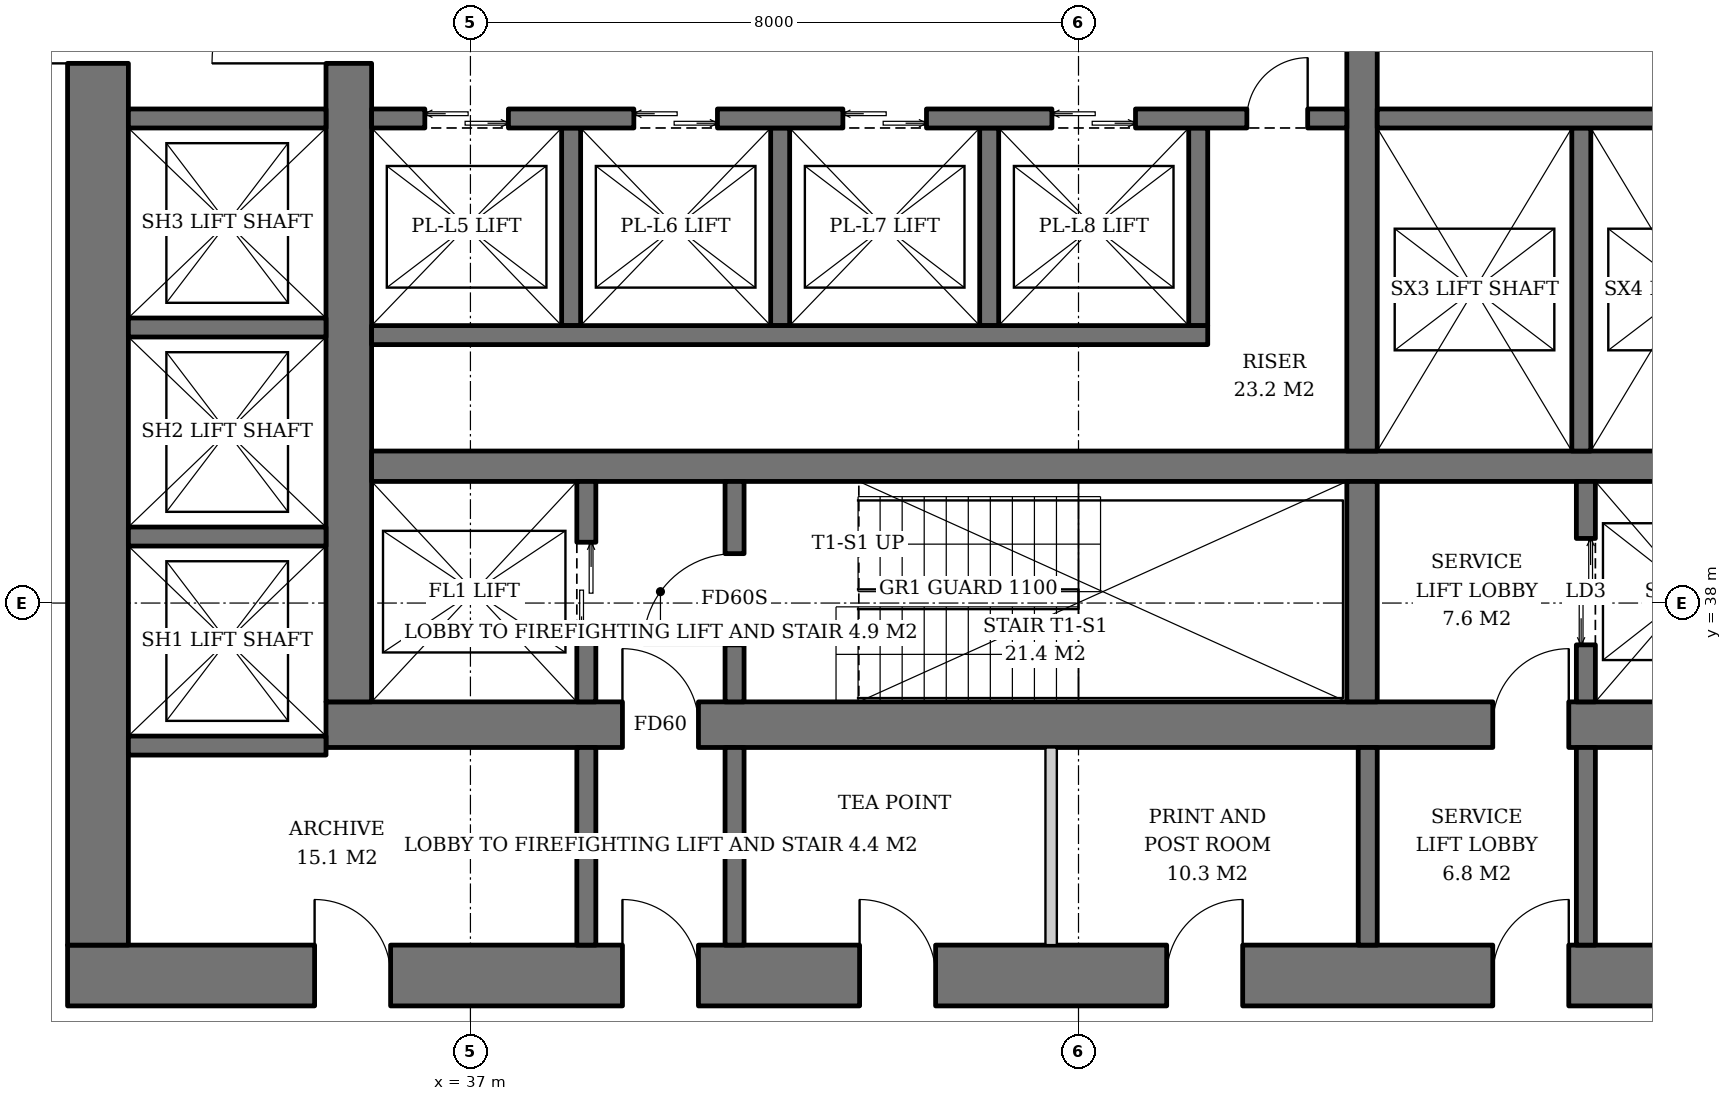
"""IFC4 building model, lengths in metres.
Left out: names, types, materials, properties, quantities, classifications, styles, units other than length and angle.
Written with IfcOpenShell. Run it as: python <this file> out.ifc"""

import sys

from ifc_helpers import new_model, si_unit, direction, frame, frame_2d, origin, place, context, subcontext, project, spatial, rectangle, extrude, element, fill, save


model = new_model("IFC4")
c1 = context("Model", 3, precision=1e-05, world=origin(), true_north=direction((0.0, 1.0)))
c2 = subcontext(c1, "Body", "Model", "MODEL_VIEW")
j1 = project(units=[si_unit("LENGTHUNIT", "METRE"), si_unit("PLANEANGLEUNIT", "RADIAN")], contexts=[c1])
p1 = place(None, origin())
s1 = spatial("IfcSite", under=j1, at=p1, CompositionType="ELEMENT")
p2 = place(p1, origin())
s2 = spatial("IfcBuilding", under=s1, at=p2, CompositionType="ELEMENT")
p3 = place(p2, frame((0.0, 0.0, 28.6)))
s3 = spatial("IfcBuildingStorey", under=s2, at=p3, CompositionType="ELEMENT", Elevation=28.6)
p4 = place(p3, frame((35.1, 36.4, 0.0), z_axis=(0.0, 0.0, 1.0), x_axis=(1.0, 0.0, 0.0)))
e1 = element("IfcWall", 1, at=p4, inside=s3, PredefinedType="SHEAR", context=c2, shape_type="SweptSolid", body=[
    extrude(rectangle(XDim=19.8, YDim=0.6, at=frame_2d((9.9, 0.0))), origin(), (0.0, 0.0, 1.0), 3.8),
])
p5 = place(p4, frame((3.9, 0.0, 0.0)))
e2 = element("IfcOpeningElement", 2, at=p5, cuts=e1, PredefinedType="OPENING", context=c2, shape_type="SweptSolid", body=[
    extrude(rectangle(XDim=1.0, YDim=2.1, at=frame_2d((0.5, 1.05))), frame((0.0, 0.31, 0.0), z_axis=(0.0, -1.0, 0.0), x_axis=(1.0, 0.0, 0.0)), (0.0, 0.0, 1.0), 0.62),
])
p6 = place(p4, frame((15.35, 0.0, 0.0)))
e3 = element("IfcOpeningElement", 3, at=p6, cuts=e1, PredefinedType="OPENING", context=c2, shape_type="SweptSolid", body=[
    extrude(rectangle(XDim=1.0, YDim=2.1, at=frame_2d((0.5, 1.05))), frame((0.0, 0.31, 0.0), z_axis=(0.0, -1.0, 0.0), x_axis=(1.0, 0.0, 0.0)), (0.0, 0.0, 1.0), 0.62),
])
p7 = place(p3, frame((35.4, 36.7, 0.0), z_axis=(0.0, 0.0, 1.0), x_axis=(0.0, 1.0, 0.0)))
e4 = element("IfcWall", 4, at=p7, inside=s3, PredefinedType="SHEAR", context=c2, shape_type="SweptSolid", body=[
    extrude(rectangle(XDim=18.6, YDim=0.6, at=frame_2d((9.3, 0.0))), origin(), (0.0, 0.0, 1.0), 3.8),
])
p8 = place(p7, frame((8.4, 0.0, 0.0)))
e5 = element("IfcOpeningElement", 5, at=p8, cuts=e4, PredefinedType="OPENING", context=c2, shape_type="SweptSolid", body=[
    extrude(rectangle(XDim=1.8, YDim=2.4, at=frame_2d((0.9, 1.2))), frame((0.0, 0.31, 0.0), z_axis=(0.0, -1.0, 0.0), x_axis=(1.0, 0.0, 0.0)), (0.0, 0.0, 1.0), 0.62),
])
p9 = place(p3, frame((31.7, 33.1, 0.0), z_axis=(0.0, 0.0, 1.0), x_axis=(1.0, 0.0, 0.0)))
e6 = element("IfcWall", 6, at=p9, inside=s3, PredefinedType="SHEAR", context=c2, shape_type="SweptSolid", body=[
    extrude(rectangle(XDim=26.6, YDim=0.8, at=frame_2d((13.3, 0.0))), origin(), (0.0, 0.0, 1.0), 3.8),
])
p10 = place(p9, frame((7.3, 0.0, 0.0)))
e7 = element("IfcOpeningElement", 7, at=p10, cuts=e6, PredefinedType="OPENING", context=c2, shape_type="SweptSolid", body=[
    extrude(rectangle(XDim=1.0, YDim=2.1, at=frame_2d((0.5, 1.05))), frame((0.0, 0.41, 0.0), z_axis=(0.0, -1.0, 0.0), x_axis=(1.0, 0.0, 0.0)), (0.0, 0.0, 1.0), 0.82),
])
p11 = place(p9, frame((18.75, 0.0, 0.0)))
e8 = element("IfcOpeningElement", 8, at=p11, cuts=e6, PredefinedType="OPENING", context=c2, shape_type="SweptSolid", body=[
    extrude(rectangle(XDim=1.0, YDim=2.1, at=frame_2d((0.5, 1.05))), frame((0.0, 0.41, 0.0), z_axis=(0.0, -1.0, 0.0), x_axis=(1.0, 0.0, 0.0)), (0.0, 0.0, 1.0), 0.82),
])
p12 = place(p9, frame((3.25, 0.0, 0.0)))
e9 = element("IfcOpeningElement", 9, at=p12, cuts=e6, PredefinedType="OPENING", context=c2, shape_type="SweptSolid", body=[
    extrude(rectangle(XDim=1.0, YDim=2.1, at=frame_2d((0.5, 1.05))), frame((0.0, 0.41, 0.0), z_axis=(0.0, -1.0, 0.0), x_axis=(1.0, 0.0, 0.0)), (0.0, 0.0, 1.0), 0.82),
])
p13 = place(p9, frame((10.42, 0.0, 0.0)))
e10 = element("IfcOpeningElement", 10, at=p13, cuts=e6, PredefinedType="OPENING", context=c2, shape_type="SweptSolid", body=[
    extrude(rectangle(XDim=1.0, YDim=2.1, at=frame_2d((0.5, 1.05))), frame((0.0, 0.41, 0.0), z_axis=(0.0, -1.0, 0.0), x_axis=(1.0, 0.0, 0.0)), (0.0, 0.0, 1.0), 0.82),
])
p14 = place(p9, frame((14.46, 0.0, 0.0)))
e11 = element("IfcOpeningElement", 11, at=p14, cuts=e6, PredefinedType="OPENING", context=c2, shape_type="SweptSolid", body=[
    extrude(rectangle(XDim=1.0, YDim=2.1, at=frame_2d((0.5, 1.05))), frame((0.0, 0.41, 0.0), z_axis=(0.0, -1.0, 0.0), x_axis=(1.0, 0.0, 0.0)), (0.0, 0.0, 1.0), 0.82),
])
p15 = place(p9, frame((22.45, 0.0, 0.0)))
e12 = element("IfcOpeningElement", 12, at=p15, cuts=e6, PredefinedType="OPENING", context=c2, shape_type="SweptSolid", body=[
    extrude(rectangle(XDim=1.0, YDim=2.1, at=frame_2d((0.5, 1.05))), frame((0.0, 0.41, 0.0), z_axis=(0.0, -1.0, 0.0), x_axis=(1.0, 0.0, 0.0)), (0.0, 0.0, 1.0), 0.82),
])
p16 = place(p3, frame((32.1, 33.5, 0.0), z_axis=(0.0, 0.0, 1.0), x_axis=(0.0, 1.0, 0.0)))
e13 = element("IfcWall", 13, at=p16, inside=s3, PredefinedType="SHEAR", context=c2, shape_type="SweptSolid", body=[
    extrude(rectangle(XDim=25.0, YDim=0.8, at=frame_2d((12.5, 0.0))), origin(), (0.0, 0.0, 1.0), 3.8),
])
p17 = place(p16, frame((11.6, 0.0, 0.0)))
e14 = element("IfcOpeningElement", 14, at=p17, cuts=e13, PredefinedType="OPENING", context=c2, shape_type="SweptSolid", body=[
    extrude(rectangle(XDim=1.8, YDim=2.4, at=frame_2d((0.9, 1.2))), frame((0.0, 0.41, 0.0), z_axis=(0.0, -1.0, 0.0), x_axis=(1.0, 0.0, 0.0)), (0.0, 0.0, 1.0), 0.82),
])
p18 = place(p3, frame((35.7, 39.8, 0.0), z_axis=(0.0, 0.0, 1.0), x_axis=(1.0, 0.0, 0.0)))
e15 = element("IfcWall", 15, at=p18, inside=s3, PredefinedType="SHEAR", context=c2, shape_type="SweptSolid", body=[
    extrude(rectangle(XDim=18.6, YDim=0.4, at=frame_2d((9.3, 0.0))), origin(), (0.0, 0.0, 1.0), 3.8),
])
p19 = place(p3, frame((48.73, 36.7, 0.0), z_axis=(0.0, 0.0, 1.0), x_axis=(0.0, 1.0, 0.0)))
e16 = element("IfcWall", 16, at=p19, inside=s3, PredefinedType="SHEAR", context=c2, shape_type="SweptSolid", body=[
    extrude(rectangle(XDim=2.9, YDim=0.4, at=frame_2d((1.45, 0.0))), origin(), (0.0, 0.0, 1.0), 3.8),
])
p20 = place(p3, frame((48.73, 40.0, 0.0), z_axis=(0.0, 0.0, 1.0), x_axis=(0.0, 1.0, 0.0)))
e17 = element("IfcWall", 17, at=p20, inside=s3, PredefinedType="SHEAR", context=c2, shape_type="SweptSolid", body=[
    extrude(rectangle(XDim=12.0, YDim=0.4, at=frame_2d((6.0, 0.0))), origin(), (0.0, 0.0, 1.0), 3.8),
])
p21 = place(p3, frame((38.525, 36.7, 0.0), z_axis=(0.0, 0.0, 1.0), x_axis=(0.0, 1.0, 0.0)))
e18 = element("IfcWall", 18, at=p21, inside=s3, PredefinedType="SHEAR", context=c2, shape_type="SweptSolid", body=[
    extrude(rectangle(XDim=2.9, YDim=0.25, at=frame_2d((1.45, 0.0))), origin(), (0.0, 0.0, 1.0), 3.8),
])
p22 = place(p21, frame((0.8, 0.0, 0.0)))
e19 = element("IfcOpeningElement", 19, at=p22, cuts=e18, PredefinedType="OPENING", context=c2, shape_type="SweptSolid", body=[
    extrude(rectangle(XDim=1.3, YDim=2.2, at=frame_2d((0.65, 1.1))), frame((0.0, 0.135, 0.0), z_axis=(0.0, -1.0, 0.0), x_axis=(1.0, 0.0, 0.0)), (0.0, 0.0, 1.0), 0.27),
])
p23 = place(p3, frame((40.475, 36.7, 0.0), z_axis=(0.0, 0.0, 1.0), x_axis=(0.0, 1.0, 0.0)))
e20 = element("IfcWall", 20, at=p23, inside=s3, PredefinedType="SHEAR", context=c2, shape_type="SweptSolid", body=[
    extrude(rectangle(XDim=2.9, YDim=0.25, at=frame_2d((1.45, 0.0))), origin(), (0.0, 0.0, 1.0), 3.8),
])
p24 = place(p23, frame((0.75, 0.0, 0.0)))
e21 = element("IfcOpeningElement", 21, at=p24, cuts=e20, PredefinedType="OPENING", context=c2, shape_type="SweptSolid", body=[
    extrude(rectangle(XDim=1.2, YDim=2.1, at=frame_2d((0.6, 1.05))), frame((0.0, 0.135, 0.0), z_axis=(0.0, -1.0, 0.0), x_axis=(1.0, 0.0, 0.0)), (0.0, 0.0, 1.0), 0.27),
])
p25 = place(p3, frame((51.675, 36.7, 0.0), z_axis=(0.0, 0.0, 1.0), x_axis=(0.0, 1.0, 0.0)))
e22 = element("IfcWall", 22, at=p25, inside=s3, PredefinedType="SHEAR", context=c2, shape_type="SweptSolid", body=[
    extrude(rectangle(XDim=2.9, YDim=0.25, at=frame_2d((1.45, 0.0))), origin(), (0.0, 0.0, 1.0), 3.8),
])
p26 = place(p25, frame((0.75, 0.0, 0.0)))
e23 = element("IfcOpeningElement", 23, at=p26, cuts=e22, PredefinedType="OPENING", context=c2, shape_type="SweptSolid", body=[
    extrude(rectangle(XDim=1.4, YDim=2.4, at=frame_2d((0.7, 1.2))), frame((0.0, 0.135, 0.0), z_axis=(0.0, -1.0, 0.0), x_axis=(1.0, 0.0, 0.0)), (0.0, 0.0, 1.0), 0.27),
])
for number, where, z_axis, x_axis in (
    (24, (38.325, 44.25, 0.0), (0.0, 0.0, 1.0), (0.0, -1.0, 0.0)),
    (25, (41.075, 44.25, 0.0), (0.0, 0.0, 1.0), (0.0, -1.0, 0.0)),
    (26, (43.825, 44.25, 0.0), (0.0, 0.0, 1.0), (0.0, -1.0, 0.0)),
    (27, (46.575, 44.25, 0.0), (0.0, 0.0, 1.0), (0.0, -1.0, 0.0)),
):
    element("IfcWall", number, at=place(p3, frame(where, z_axis=z_axis, x_axis=x_axis)), inside=s3, PredefinedType="SHEAR", context=c2, shape_type="SweptSolid", body=[
        extrude(rectangle(XDim=2.6, YDim=0.25, at=frame_2d((1.3, 0.0))), origin(), (0.0, 0.0, 1.0), 3.8),
    ])
p27 = place(p3, frame((35.7, 41.525, 0.0), z_axis=(0.0, 0.0, 1.0), x_axis=(1.0, 0.0, 0.0)))
e28 = element("IfcWall", 28, at=p27, inside=s3, PredefinedType="SHEAR", context=c2, shape_type="SweptSolid", body=[
    extrude(rectangle(XDim=11.0, YDim=0.25, at=frame_2d((5.5, 0.0))), origin(), (0.0, 0.0, 1.0), 3.8),
])
p28 = place(p3, frame((35.7, 44.375, 0.0), z_axis=(0.0, 0.0, 1.0), x_axis=(1.0, 0.0, 0.0)))
e29 = element("IfcWall", 29, at=p28, inside=s3, PredefinedType="SHEAR", context=c2, shape_type="SweptSolid", body=[
    extrude(rectangle(XDim=12.83, YDim=0.25, at=frame_2d((6.415, 0.0))), origin(), (0.0, 0.0, 1.0), 3.8),
])
p29 = place(p28, frame((0.7, 0.0, 0.0)))
e30 = element("IfcOpeningElement", 30, at=p29, cuts=e29, PredefinedType="OPENING", context=c2, shape_type="SweptSolid", body=[
    extrude(rectangle(XDim=1.1, YDim=2.2, at=frame_2d((0.55, 1.1))), frame((0.0, 0.135, 0.0), z_axis=(0.0, -1.0, 0.0), x_axis=(1.0, 0.0, 0.0)), (0.0, 0.0, 1.0), 0.27),
])
p30 = place(p28, frame((3.45, 0.0, 0.0)))
e31 = element("IfcOpeningElement", 31, at=p30, cuts=e29, PredefinedType="OPENING", context=c2, shape_type="SweptSolid", body=[
    extrude(rectangle(XDim=1.1, YDim=2.2, at=frame_2d((0.55, 1.1))), frame((0.0, 0.135, 0.0), z_axis=(0.0, -1.0, 0.0), x_axis=(1.0, 0.0, 0.0)), (0.0, 0.0, 1.0), 0.27),
])
p31 = place(p28, frame((6.2, 0.0, 0.0)))
e32 = element("IfcOpeningElement", 32, at=p31, cuts=e29, PredefinedType="OPENING", context=c2, shape_type="SweptSolid", body=[
    extrude(rectangle(XDim=1.1, YDim=2.2, at=frame_2d((0.55, 1.1))), frame((0.0, 0.135, 0.0), z_axis=(0.0, -1.0, 0.0), x_axis=(1.0, 0.0, 0.0)), (0.0, 0.0, 1.0), 0.27),
])
p32 = place(p28, frame((8.95, 0.0, 0.0)))
e33 = element("IfcOpeningElement", 33, at=p32, cuts=e29, PredefinedType="OPENING", context=c2, shape_type="SweptSolid", body=[
    extrude(rectangle(XDim=1.1, YDim=2.2, at=frame_2d((0.55, 1.1))), frame((0.0, 0.135, 0.0), z_axis=(0.0, -1.0, 0.0), x_axis=(1.0, 0.0, 0.0)), (0.0, 0.0, 1.0), 0.27),
])
p33 = place(p28, frame((11.515, 0.0, 0.0)))
e34 = element("IfcOpeningElement", 34, at=p33, cuts=e29, PredefinedType="OPENING", context=c2, shape_type="SweptSolid", body=[
    extrude(rectangle(XDim=0.8, YDim=2.0, at=frame_2d((0.4, 1.0))), frame((0.0, 0.135, 0.0), z_axis=(0.0, -1.0, 0.0), x_axis=(1.0, 0.0, 0.0)), (0.0, 0.0, 1.0), 0.27),
])
p34 = place(p3, frame((51.615, 44.25, 0.0), z_axis=(0.0, 0.0, 1.0), x_axis=(0.0, -1.0, 0.0)))
e35 = element("IfcWall", 35, at=p34, inside=s3, PredefinedType="SHEAR", context=c2, shape_type="SweptSolid", body=[
    extrude(rectangle(XDim=4.25, YDim=0.25, at=frame_2d((2.125, 0.0))), origin(), (0.0, 0.0, 1.0), 3.8),
])
p35 = place(p3, frame((48.93, 44.375, 0.0), z_axis=(0.0, 0.0, 1.0), x_axis=(1.0, 0.0, 0.0)))
e36 = element("IfcWall", 36, at=p35, inside=s3, PredefinedType="SHEAR", context=c2, shape_type="SweptSolid", body=[
    extrude(rectangle(XDim=5.37, YDim=0.25, at=frame_2d((2.685, 0.0))), origin(), (0.0, 0.0, 1.0), 3.8),
])
for number, where, z_axis, x_axis in (
    (37, (32.5, 36.125, 0.0), (0.0, 0.0, 1.0), (1.0, 0.0, 0.0)),
    (38, (32.5, 38.875, 0.0), (0.0, 0.0, 1.0), (1.0, 0.0, 0.0)),
    (39, (32.5, 41.625, 0.0), (0.0, 0.0, 1.0), (1.0, 0.0, 0.0)),
    (40, (32.5, 44.375, 0.0), (0.0, 0.0, 1.0), (1.0, 0.0, 0.0)),
):
    element("IfcWall", number, at=place(p3, frame(where, z_axis=z_axis, x_axis=x_axis)), inside=s3, PredefinedType="SHEAR", context=c2, shape_type="SweptSolid", body=[
        extrude(rectangle(XDim=2.6, YDim=0.25, at=frame_2d((1.3, 0.0))), origin(), (0.0, 0.0, 1.0), 3.8),
    ])
for number, where, z_axis, x_axis in (
    (41, (38.525, 33.5, 0.0), (0.0, 0.0, 1.0), (0.0, 1.0, 0.0)),
    (42, (40.475, 33.5, 0.0), (0.0, 0.0, 1.0), (0.0, 1.0, 0.0)),
    (43, (48.805, 33.5, 0.0), (0.0, 0.0, 1.0), (0.0, 1.0, 0.0)),
    (44, (51.675, 33.5, 0.0), (0.0, 0.0, 1.0), (0.0, 1.0, 0.0)),
):
    element("IfcWall", number, at=place(p3, frame(where, z_axis=z_axis, x_axis=x_axis)), inside=s3, PredefinedType="SOLIDWALL", context=c2, shape_type="SweptSolid", body=[
        extrude(rectangle(XDim=2.6, YDim=0.25, at=frame_2d((1.3, 0.0))), origin(), (0.0, 0.0, 1.0), 3.62),
    ])
p36 = place(p3, frame((44.64, 33.5, 0.0), z_axis=(0.0, 0.0, 1.0), x_axis=(0.0, 1.0, 0.0)))
e45 = element("IfcWall", 45, at=p36, inside=s3, PredefinedType="SOLIDWALL", context=c2, shape_type="SweptSolid", body=[
    extrude(rectangle(XDim=2.6, YDim=0.15, at=frame_2d((1.3, 0.0))), origin(), (0.0, 0.0, 1.0), 3.62),
])
p37 = place(p22, origin())
e46 = element("IfcDoor", 46, at=p37, inside=s3, OperationType="DOUBLE_DOOR_SLIDING", PredefinedType="DOOR", context=c2, shape_type="SweptSolid", body=[
    extrude(rectangle(XDim=1.3, YDim=2.2, at=frame_2d((0.65, 1.1))), frame((0.0, 0.025, 0.0), z_axis=(0.0, -1.0, 0.0), x_axis=(1.0, 0.0, 0.0)), (0.0, 0.0, 1.0), 0.05),
])
fill(e19, e46)
p38 = place(p24, origin())
e47 = element("IfcDoor", 47, at=p38, inside=s3, OperationType="SINGLE_SWING_LEFT", PredefinedType="DOOR", context=c2, shape_type="SweptSolid", body=[
    extrude(rectangle(XDim=1.2, YDim=2.1, at=frame_2d((0.6, 1.05))), frame((0.0, 0.025, 0.0), z_axis=(0.0, -1.0, 0.0), x_axis=(1.0, 0.0, 0.0)), (0.0, 0.0, 1.0), 0.05),
])
fill(e21, e47)
p39 = place(p26, origin())
e48 = element("IfcDoor", 48, at=p39, inside=s3, OperationType="DOUBLE_DOOR_SLIDING", PredefinedType="DOOR", context=c2, shape_type="SweptSolid", body=[
    extrude(rectangle(XDim=1.4, YDim=2.4, at=frame_2d((0.7, 1.2))), frame((0.0, 0.025, 0.0), z_axis=(0.0, -1.0, 0.0), x_axis=(1.0, 0.0, 0.0)), (0.0, 0.0, 1.0), 0.05),
])
fill(e23, e48)
p40 = place(p29, origin())
e49 = element("IfcDoor", 49, at=p40, inside=s3, OperationType="DOUBLE_DOOR_SLIDING", PredefinedType="DOOR", context=c2, shape_type="SweptSolid", body=[
    extrude(rectangle(XDim=1.1, YDim=2.2, at=frame_2d((0.55, 1.1))), frame((0.0, 0.025, 0.0), z_axis=(0.0, -1.0, 0.0), x_axis=(1.0, 0.0, 0.0)), (0.0, 0.0, 1.0), 0.05),
])
fill(e30, e49)
p41 = place(p30, origin())
e50 = element("IfcDoor", 50, at=p41, inside=s3, OperationType="DOUBLE_DOOR_SLIDING", PredefinedType="DOOR", context=c2, shape_type="SweptSolid", body=[
    extrude(rectangle(XDim=1.1, YDim=2.2, at=frame_2d((0.55, 1.1))), frame((0.0, 0.025, 0.0), z_axis=(0.0, -1.0, 0.0), x_axis=(1.0, 0.0, 0.0)), (0.0, 0.0, 1.0), 0.05),
])
fill(e31, e50)
p42 = place(p31, origin())
e51 = element("IfcDoor", 51, at=p42, inside=s3, OperationType="DOUBLE_DOOR_SLIDING", PredefinedType="DOOR", context=c2, shape_type="SweptSolid", body=[
    extrude(rectangle(XDim=1.1, YDim=2.2, at=frame_2d((0.55, 1.1))), frame((0.0, 0.025, 0.0), z_axis=(0.0, -1.0, 0.0), x_axis=(1.0, 0.0, 0.0)), (0.0, 0.0, 1.0), 0.05),
])
fill(e32, e51)
p43 = place(p32, origin())
e52 = element("IfcDoor", 52, at=p43, inside=s3, OperationType="DOUBLE_DOOR_SLIDING", PredefinedType="DOOR", context=c2, shape_type="SweptSolid", body=[
    extrude(rectangle(XDim=1.1, YDim=2.2, at=frame_2d((0.55, 1.1))), frame((0.0, 0.025, 0.0), z_axis=(0.0, -1.0, 0.0), x_axis=(1.0, 0.0, 0.0)), (0.0, 0.0, 1.0), 0.05),
])
fill(e33, e52)
p44 = place(p33, origin())
e53 = element("IfcDoor", 53, at=p44, inside=s3, OperationType="SINGLE_SWING_RIGHT", PredefinedType="DOOR", context=c2, shape_type="SweptSolid", body=[
    extrude(rectangle(XDim=0.8, YDim=2.0, at=frame_2d((0.4, 1.0))), frame((0.0, 0.025, 0.0), z_axis=(0.0, -1.0, 0.0), x_axis=(1.0, 0.0, 0.0)), (0.0, 0.0, 1.0), 0.05),
])
fill(e34, e53)
p45 = place(p5, origin())
e54 = element("IfcDoor", 54, at=p45, inside=s3, OperationType="SINGLE_SWING_LEFT", PredefinedType="DOOR", context=c2, shape_type="SweptSolid", body=[
    extrude(rectangle(XDim=1.0, YDim=2.1, at=frame_2d((0.5, 1.05))), frame((0.0, 0.025, 0.0), z_axis=(0.0, -1.0, 0.0), x_axis=(1.0, 0.0, 0.0)), (0.0, 0.0, 1.0), 0.05),
])
fill(e2, e54)
p46 = place(p8, origin())
e55 = element("IfcDoor", 55, at=p46, inside=s3, OperationType="DOUBLE_DOOR_SINGLE_SWING", PredefinedType="DOOR", context=c2, shape_type="SweptSolid", body=[
    extrude(rectangle(XDim=1.8, YDim=2.4, at=frame_2d((0.9, 1.2))), frame((0.0, 0.025, 0.0), z_axis=(0.0, -1.0, 0.0), x_axis=(1.0, 0.0, 0.0)), (0.0, 0.0, 1.0), 0.05),
])
fill(e5, e55)
p47 = place(p6, origin())
e56 = element("IfcDoor", 56, at=p47, inside=s3, OperationType="SINGLE_SWING_RIGHT", PredefinedType="DOOR", context=c2, shape_type="SweptSolid", body=[
    extrude(rectangle(XDim=1.0, YDim=2.1, at=frame_2d((0.5, 1.05))), frame((0.0, 0.025, 0.0), z_axis=(0.0, -1.0, 0.0), x_axis=(1.0, 0.0, 0.0)), (0.0, 0.0, 1.0), 0.05),
])
fill(e3, e56)
p48 = place(p17, origin())
e57 = element("IfcDoor", 57, at=p48, inside=s3, OperationType="DOUBLE_DOOR_SINGLE_SWING", PredefinedType="DOOR", context=c2, shape_type="SweptSolid", body=[
    extrude(rectangle(XDim=1.8, YDim=2.4, at=frame_2d((0.9, 1.2))), frame((0.0, 0.025, 0.0), z_axis=(0.0, -1.0, 0.0), x_axis=(1.0, 0.0, 0.0)), (0.0, 0.0, 1.0), 0.05),
])
fill(e14, e57)
p49 = place(p10, origin())
e58 = element("IfcDoor", 58, at=p49, inside=s3, OperationType="SINGLE_SWING_LEFT", PredefinedType="DOOR", context=c2, shape_type="SweptSolid", body=[
    extrude(rectangle(XDim=1.0, YDim=2.1, at=frame_2d((0.5, 1.05))), frame((0.0, 0.025, 0.0), z_axis=(0.0, -1.0, 0.0), x_axis=(1.0, 0.0, 0.0)), (0.0, 0.0, 1.0), 0.05),
])
fill(e7, e58)
p50 = place(p11, origin())
e59 = element("IfcDoor", 59, at=p50, inside=s3, OperationType="SINGLE_SWING_RIGHT", PredefinedType="DOOR", context=c2, shape_type="SweptSolid", body=[
    extrude(rectangle(XDim=1.0, YDim=2.1, at=frame_2d((0.5, 1.05))), frame((0.0, 0.025, 0.0), z_axis=(0.0, -1.0, 0.0), x_axis=(1.0, 0.0, 0.0)), (0.0, 0.0, 1.0), 0.05),
])
fill(e8, e59)
p51 = place(p12, origin())
e60 = element("IfcDoor", 60, at=p51, inside=s3, OperationType="SINGLE_SWING_LEFT", PredefinedType="DOOR", context=c2, shape_type="SweptSolid", body=[
    extrude(rectangle(XDim=1.0, YDim=2.1, at=frame_2d((0.5, 1.05))), frame((0.0, 0.39, 0.0), z_axis=(0.0, -1.0, 0.0), x_axis=(1.0, 0.0, 0.0)), (0.0, 0.0, 1.0), 0.05),
])
fill(e9, e60)
p52 = place(p13, origin())
e61 = element("IfcDoor", 61, at=p52, inside=s3, OperationType="SINGLE_SWING_LEFT", PredefinedType="DOOR", context=c2, shape_type="SweptSolid", body=[
    extrude(rectangle(XDim=1.0, YDim=2.1, at=frame_2d((0.5, 1.05))), frame((0.0, 0.39, 0.0), z_axis=(0.0, -1.0, 0.0), x_axis=(1.0, 0.0, 0.0)), (0.0, 0.0, 1.0), 0.05),
])
fill(e10, e61)
p53 = place(p14, origin())
e62 = element("IfcDoor", 62, at=p53, inside=s3, OperationType="SINGLE_SWING_RIGHT", PredefinedType="DOOR", context=c2, shape_type="SweptSolid", body=[
    extrude(rectangle(XDim=1.0, YDim=2.1, at=frame_2d((0.5, 1.05))), frame((0.0, 0.39, 0.0), z_axis=(0.0, -1.0, 0.0), x_axis=(1.0, 0.0, 0.0)), (0.0, 0.0, 1.0), 0.05),
])
fill(e11, e62)
save(model, sys.argv[1])
